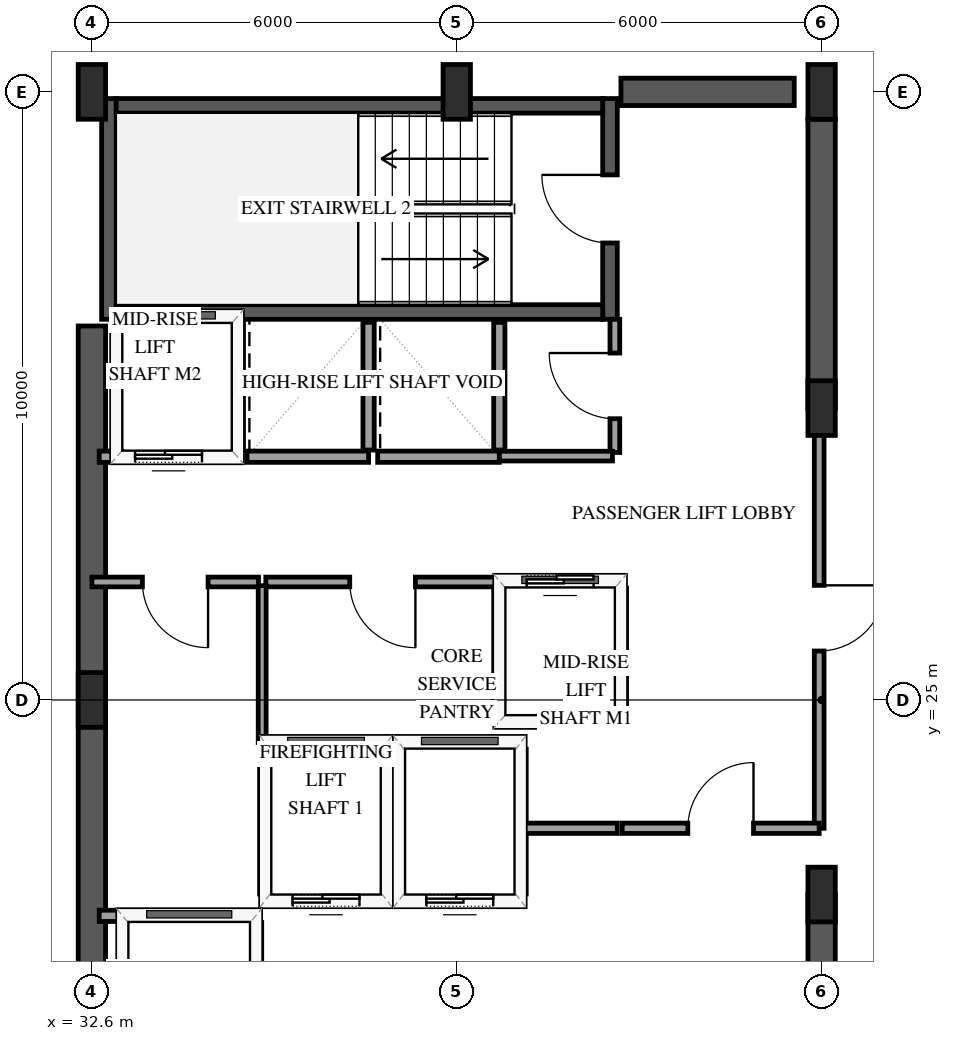
"""IFC4 building model, lengths in metres.
Left out: names, types, materials, properties, quantities, classifications, styles, units other than length and angle.
Written with IfcOpenShell. Run it as: python <this file> out.ifc"""

import sys

from ifc_helpers import new_model, si_unit, direction, frame, frame_2d, origin, origin_2d, place, context, subcontext, project, spatial, rectangle, extrude, element, fill, save


model = new_model("IFC4")
c1 = context("Model", 3, precision=1e-05, world=origin(), true_north=direction((0.0, 1.0)))
c2 = subcontext(c1, "Body", "Model", "MODEL_VIEW")
j1 = project(units=[si_unit("LENGTHUNIT", "METRE"), si_unit("PLANEANGLEUNIT", "RADIAN")], contexts=[c1])
p1 = place(None, origin())
s1 = spatial("IfcSite", under=j1, at=p1, CompositionType="ELEMENT")
p2 = place(p1, origin())
s2 = spatial("IfcBuilding", under=s1, at=p2, CompositionType="ELEMENT")
p3 = place(p2, frame((0.0, 0.0, 205.0)))
s3 = spatial("IfcBuildingStorey", under=s2, at=p3, CompositionType="ELEMENT", Elevation=205.0)
p4 = place(p3, frame((32.88, 31.26, 0.0), z_axis=(0.0, 0.0, 1.0), x_axis=(0.0, 1.0, 0.0)))
e1 = element("IfcWall", 1, at=p4, inside=s3, PredefinedType="SHEAR", context=c2, shape_type="SweptSolid", body=[
    extrude(rectangle(XDim=3.63, YDim=0.24, at=frame_2d((1.815, 0.0))), origin(), (0.0, 0.0, 1.0), 3.6),
])
p5 = place(p3, frame((41.12, 31.26, 0.0), z_axis=(0.0, 0.0, 1.0), x_axis=(0.0, 1.0, 0.0)))
e2 = element("IfcWall", 2, at=p5, inside=s3, PredefinedType="SHEAR", context=c2, shape_type="SweptSolid", body=[
    extrude(rectangle(XDim=3.63, YDim=0.24, at=frame_2d((1.815, 0.0))), origin(), (0.0, 0.0, 1.0), 3.6),
])
p6 = place(p5, frame((1.255, 0.0, 0.0)))
e3 = element("IfcOpeningElement", 3, at=p6, cuts=e2, PredefinedType="OPENING", context=c2, shape_type="SweptSolid", body=[
    extrude(rectangle(XDim=1.12, YDim=2.15, at=frame_2d((0.56, 1.075))), frame((0.0, 0.13, 0.0), z_axis=(0.0, -1.0, 0.0), x_axis=(1.0, 0.0, 0.0)), (0.0, 0.0, 1.0), 0.26),
])
for number, where, z_axis, x_axis in (
    (4, (33.0, 31.38, 0.0), (0.0, 0.0, 1.0), (1.0, 0.0, 0.0)),
    (5, (33.0, 34.77, 0.0), (0.0, 0.0, 1.0), (1.0, 0.0, 0.0)),
):
    element("IfcWall", number, at=place(p3, frame(where, z_axis=z_axis, x_axis=x_axis)), inside=s3, PredefinedType="SHEAR", context=c2, shape_type="SweptSolid", body=[
        extrude(rectangle(XDim=8.0, YDim=0.24, at=frame_2d((4.0, 0.0))), origin(), (0.0, 0.0, 1.0), 3.6),
    ])
p7 = place(p3, frame((32.6, 18.85, 0.0), z_axis=(0.0, 0.0, 1.0), x_axis=(0.0, 1.0, 0.0)))
e6 = element("IfcWall", 6, at=p7, inside=s3, PredefinedType="SHEAR", context=c2, shape_type="SweptSolid", body=[
    extrude(rectangle(XDim=12.3, YDim=0.45, at=frame_2d((6.15, 0.0))), origin(), (0.0, 0.0, 1.0), 3.6),
])
p8 = place(p3, frame((41.3, 35.0, 0.0), z_axis=(0.0, 0.0, 1.0), x_axis=(1.0, 0.0, 0.0)))
e7 = element("IfcWall", 7, at=p8, inside=s3, PredefinedType="SHEAR", context=c2, shape_type="SweptSolid", body=[
    extrude(rectangle(XDim=2.85, YDim=0.45, at=frame_2d((1.425, 0.0))), origin(), (0.0, 0.0, 1.0), 3.6),
])
p9 = place(p3, frame((44.6, 15.45, 0.0), z_axis=(0.0, 0.0, 1.0), x_axis=(0.0, 1.0, 0.0)))
e8 = element("IfcWall", 8, at=p9, inside=s3, PredefinedType="SHEAR", context=c2, shape_type="SweptSolid", body=[
    extrude(rectangle(XDim=6.35, YDim=0.45, at=frame_2d((3.175, 0.0))), origin(), (0.0, 0.0, 1.0), 3.6),
])
p10 = place(p3, frame((44.6, 29.8, 0.0), z_axis=(0.0, 0.0, 1.0), x_axis=(0.0, 1.0, 0.0)))
e9 = element("IfcWall", 9, at=p10, inside=s3, PredefinedType="SHEAR", context=c2, shape_type="SweptSolid", body=[
    extrude(rectangle(XDim=4.75, YDim=0.45, at=frame_2d((2.375, 0.0))), origin(), (0.0, 0.0, 1.0), 3.6),
])
for number, where, z_axis, x_axis in (
    (10, (32.6, 25.0, 0.0), (0.0, 0.0, 1.0), (1.0, 0.0, 0.0)),
    (11, (32.6, 35.0, 0.0), (0.0, 0.0, 1.0), (1.0, 0.0, 0.0)),
    (12, (38.6, 35.0, 0.0), (0.0, 0.0, 1.0), (1.0, 0.0, 0.0)),
    (13, (44.6, 21.8, 0.0), (0.0, 0.0, 1.0), (1.0, 0.0, 0.0)),
    (14, (44.6, 29.8, 0.0), (0.0, 0.0, 1.0), (1.0, 0.0, 0.0)),
    (15, (44.6, 35.0, 0.0), (0.0, 0.0, 1.0), (1.0, 0.0, 0.0)),
):
    element("IfcColumn", number, at=place(p3, frame(where, z_axis=z_axis, x_axis=x_axis)), inside=s3, PredefinedType="PILASTER", context=c2, shape_type="SweptSolid", body=[
        extrude(rectangle(XDim=0.45, YDim=0.9, at=origin_2d()), origin(), (0.0, 0.0, 1.0), 3.6),
    ])
p11 = place(p3, frame((35.45, 21.7, 0.0), z_axis=(0.0, 0.0, 1.0), x_axis=(1.0, 0.0, 0.0)))
e16 = element("IfcWall", 16, at=p11, inside=s3, PredefinedType="SOLIDWALL", context=c2, shape_type="SweptSolid", body=[
    extrude(rectangle(XDim=2.0, YDim=0.185, at=frame_2d((1.0, 0.0))), origin(), (0.0, 0.0, 1.0), 3.3),
])
p12 = place(p11, frame((0.45, 0.0, 0.0)))
e17 = element("IfcOpeningElement", 17, at=p12, cuts=e16, PredefinedType="OPENING", context=c2, shape_type="SweptSolid", body=[
    extrude(rectangle(XDim=1.1, YDim=2.15, at=frame_2d((0.55, 1.075))), frame((0.0, 0.103, 0.0), z_axis=(0.0, -1.0, 0.0), x_axis=(1.0, 0.0, 0.0)), (0.0, 0.0, 1.0), 0.205),
])
p13 = place(p3, frame((35.45, 24.3, 0.0), z_axis=(0.0, 0.0, 1.0), x_axis=(1.0, 0.0, 0.0)))
e18 = element("IfcWall", 18, at=p13, inside=s3, PredefinedType="SOLIDWALL", context=c2, shape_type="SweptSolid", body=[
    extrude(rectangle(XDim=2.0, YDim=0.185, at=frame_2d((1.0, 0.0))), origin(), (0.0, 0.0, 1.0), 3.3),
])
for number, where, z_axis, x_axis in (
    (19, (35.45, 21.81, 0.0), (0.0, 0.0, 1.0), (0.0, 1.0, 0.0)),
    (20, (37.45, 21.81, 0.0), (0.0, 0.0, 1.0), (0.0, 1.0, 0.0)),
):
    element("IfcWall", number, at=place(p3, frame(where, z_axis=z_axis, x_axis=x_axis)), inside=s3, PredefinedType="SOLIDWALL", context=c2, shape_type="SweptSolid", body=[
        extrude(rectangle(XDim=2.38, YDim=0.185, at=frame_2d((1.19, 0.0))), origin(), (0.0, 0.0, 1.0), 3.3),
    ])
p14 = place(p3, frame((37.65, 21.7, 0.0), z_axis=(0.0, 0.0, 1.0), x_axis=(1.0, 0.0, 0.0)))
e21 = element("IfcWall", 21, at=p14, inside=s3, PredefinedType="SOLIDWALL", context=c2, shape_type="SweptSolid", body=[
    extrude(rectangle(XDim=2.0, YDim=0.185, at=frame_2d((1.0, 0.0))), origin(), (0.0, 0.0, 1.0), 3.3),
])
p15 = place(p14, frame((0.45, 0.0, 0.0)))
e22 = element("IfcOpeningElement", 22, at=p15, cuts=e21, PredefinedType="OPENING", context=c2, shape_type="SweptSolid", body=[
    extrude(rectangle(XDim=1.1, YDim=2.15, at=frame_2d((0.55, 1.075))), frame((0.0, 0.103, 0.0), z_axis=(0.0, -1.0, 0.0), x_axis=(1.0, 0.0, 0.0)), (0.0, 0.0, 1.0), 0.205),
])
p16 = place(p3, frame((37.65, 24.3, 0.0), z_axis=(0.0, 0.0, 1.0), x_axis=(1.0, 0.0, 0.0)))
e23 = element("IfcWall", 23, at=p16, inside=s3, PredefinedType="SOLIDWALL", context=c2, shape_type="SweptSolid", body=[
    extrude(rectangle(XDim=2.0, YDim=0.185, at=frame_2d((1.0, 0.0))), origin(), (0.0, 0.0, 1.0), 3.3),
])
p17 = place(p3, frame((39.65, 21.81, 0.0), z_axis=(0.0, 0.0, 1.0), x_axis=(0.0, 1.0, 0.0)))
e24 = element("IfcWall", 24, at=p17, inside=s3, PredefinedType="SOLIDWALL", context=c2, shape_type="SweptSolid", body=[
    extrude(rectangle(XDim=2.38, YDim=0.185, at=frame_2d((1.19, 0.0))), origin(), (0.0, 0.0, 1.0), 3.3),
])
p18 = place(p3, frame((32.72, 21.45, 0.0), z_axis=(0.0, 0.0, 1.0), x_axis=(1.0, 0.0, 0.0)))
e25 = element("IfcWall", 25, at=p18, inside=s3, PredefinedType="SOLIDWALL", context=c2, shape_type="SweptSolid", body=[
    extrude(rectangle(XDim=2.58, YDim=0.185, at=frame_2d((1.29, 0.0))), origin(), (0.0, 0.0, 1.0), 3.3),
])
p19 = place(p3, frame((35.3, 18.79, 0.0), z_axis=(0.0, 0.0, 1.0), x_axis=(0.0, 1.0, 0.0)))
e26 = element("IfcWall", 26, at=p19, inside=s3, PredefinedType="SOLIDWALL", context=c2, shape_type="SweptSolid", body=[
    extrude(rectangle(XDim=2.55, YDim=0.185, at=frame_2d((1.275, 0.0))), origin(), (0.0, 0.0, 1.0), 3.3),
])
p20 = place(p19, frame((0.725, 0.0, 0.0)))
e27 = element("IfcOpeningElement", 27, at=p20, cuts=e26, PredefinedType="OPENING", context=c2, shape_type="SweptSolid", body=[
    extrude(rectangle(XDim=1.1, YDim=2.15, at=frame_2d((0.55, 1.075))), frame((0.0, 0.103, 0.0), z_axis=(0.0, -1.0, 0.0), x_axis=(1.0, 0.0, 0.0)), (0.0, 0.0, 1.0), 0.205),
])
p21 = place(p3, frame((39.3, 24.65, 0.0), z_axis=(0.0, 0.0, 1.0), x_axis=(1.0, 0.0, 0.0)))
e28 = element("IfcWall", 28, at=p21, inside=s3, PredefinedType="SOLIDWALL", context=c2, shape_type="SweptSolid", body=[
    extrude(rectangle(XDim=2.0, YDim=0.185, at=frame_2d((1.0, 0.0))), origin(), (0.0, 0.0, 1.0), 3.3),
])
p22 = place(p3, frame((39.3, 26.95, 0.0), z_axis=(0.0, 0.0, 1.0), x_axis=(1.0, 0.0, 0.0)))
e29 = element("IfcWall", 29, at=p22, inside=s3, PredefinedType="SOLIDWALL", context=c2, shape_type="SweptSolid", body=[
    extrude(rectangle(XDim=2.0, YDim=0.185, at=frame_2d((1.0, 0.0))), origin(), (0.0, 0.0, 1.0), 3.3),
])
p23 = place(p22, frame((0.45, 0.0, 0.0)))
e30 = element("IfcOpeningElement", 30, at=p23, cuts=e29, PredefinedType="OPENING", context=c2, shape_type="SweptSolid", body=[
    extrude(rectangle(XDim=1.1, YDim=2.15, at=frame_2d((0.55, 1.075))), frame((0.0, 0.103, 0.0), z_axis=(0.0, -1.0, 0.0), x_axis=(1.0, 0.0, 0.0)), (0.0, 0.0, 1.0), 0.205),
])
for number, where, z_axis, x_axis in (
    (31, (39.3, 24.76, 0.0), (0.0, 0.0, 1.0), (0.0, 1.0, 0.0)),
    (32, (41.3, 24.76, 0.0), (0.0, 0.0, 1.0), (0.0, 1.0, 0.0)),
):
    element("IfcWall", number, at=place(p3, frame(where, z_axis=z_axis, x_axis=x_axis)), inside=s3, PredefinedType="SOLIDWALL", context=c2, shape_type="SweptSolid", body=[
        extrude(rectangle(XDim=2.08, YDim=0.185, at=frame_2d((1.04, 0.0))), origin(), (0.0, 0.0, 1.0), 3.3),
    ])
p24 = place(p3, frame((32.72, 29.0, 0.0), z_axis=(0.0, 0.0, 1.0), x_axis=(1.0, 0.0, 0.0)))
e33 = element("IfcWall", 33, at=p24, inside=s3, PredefinedType="SOLIDWALL", context=c2, shape_type="SweptSolid", body=[
    extrude(rectangle(XDim=2.28, YDim=0.185, at=frame_2d((1.14, 0.0))), origin(), (0.0, 0.0, 1.0), 3.3),
])
p25 = place(p24, frame((0.59, 0.0, 0.0)))
e34 = element("IfcOpeningElement", 34, at=p25, cuts=e33, PredefinedType="OPENING", context=c2, shape_type="SweptSolid", body=[
    extrude(rectangle(XDim=1.1, YDim=2.15, at=frame_2d((0.55, 1.075))), frame((0.0, 0.103, 0.0), z_axis=(0.0, -1.0, 0.0), x_axis=(1.0, 0.0, 0.0)), (0.0, 0.0, 1.0), 0.205),
])
p26 = place(p3, frame((35.0, 29.11, 0.0), z_axis=(0.0, 0.0, 1.0), x_axis=(0.0, 1.0, 0.0)))
e35 = element("IfcWall", 35, at=p26, inside=s3, PredefinedType="SOLIDWALL", context=c2, shape_type="SweptSolid", body=[
    extrude(rectangle(XDim=2.1, YDim=0.185, at=frame_2d((1.05, 0.0))), origin(), (0.0, 0.0, 1.0), 3.3),
])
p27 = place(p3, frame((35.15, 29.0, 0.0), z_axis=(0.0, 0.0, 1.0), x_axis=(1.0, 0.0, 0.0)))
e36 = element("IfcWall", 36, at=p27, inside=s3, PredefinedType="SOLIDWALL", context=c2, shape_type="SweptSolid", body=[
    extrude(rectangle(XDim=2.0, YDim=0.185, at=frame_2d((1.0, 0.0))), origin(), (0.0, 0.0, 1.0), 3.3),
])
p28 = place(p3, frame((37.15, 29.11, 0.0), z_axis=(0.0, 0.0, 1.0), x_axis=(0.0, 1.0, 0.0)))
e37 = element("IfcWall", 37, at=p28, inside=s3, PredefinedType="SOLIDWALL", context=c2, shape_type="SweptSolid", body=[
    extrude(rectangle(XDim=2.1, YDim=0.185, at=frame_2d((1.05, 0.0))), origin(), (0.0, 0.0, 1.0), 3.3),
])
p29 = place(p3, frame((37.3, 29.0, 0.0), z_axis=(0.0, 0.0, 1.0), x_axis=(1.0, 0.0, 0.0)))
e38 = element("IfcWall", 38, at=p29, inside=s3, PredefinedType="SOLIDWALL", context=c2, shape_type="SweptSolid", body=[
    extrude(rectangle(XDim=2.0, YDim=0.185, at=frame_2d((1.0, 0.0))), origin(), (0.0, 0.0, 1.0), 3.3),
])
p30 = place(p3, frame((39.3, 29.11, 0.0), z_axis=(0.0, 0.0, 1.0), x_axis=(0.0, 1.0, 0.0)))
e39 = element("IfcWall", 39, at=p30, inside=s3, PredefinedType="SOLIDWALL", context=c2, shape_type="SweptSolid", body=[
    extrude(rectangle(XDim=2.1, YDim=0.185, at=frame_2d((1.05, 0.0))), origin(), (0.0, 0.0, 1.0), 3.3),
])
p31 = place(p3, frame((44.56, 29.8, 0.0), z_axis=(0.0, 0.0, 1.0), x_axis=(0.0, -1.0, 0.0)))
e40 = element("IfcWall", 40, at=p31, inside=s3, PredefinedType="PARTITIONING", context=c2, shape_type="SweptSolid", body=[
    extrude(rectangle(XDim=6.91, YDim=0.16, at=frame_2d((3.455, 0.0))), origin(), (0.0, 0.0, 1.0), 2.34),
])
p32 = place(p31, frame((2.915, 0.0, 0.0)))
e41 = element("IfcOpeningElement", 41, at=p32, cuts=e40, PredefinedType="OPENING", context=c2, shape_type="SweptSolid", body=[
    extrude(rectangle(XDim=1.08, YDim=2.15, at=frame_2d((0.54, 1.075))), frame((0.0, 0.09, 0.0), z_axis=(0.0, -1.0, 0.0), x_axis=(1.0, 0.0, 0.0)), (0.0, 0.0, 1.0), 0.18),
])
p33 = place(p3, frame((39.3, 26.94, 0.0), z_axis=(0.0, 0.0, 1.0), x_axis=(-1.0, 0.0, 0.0)))
e42 = element("IfcWall", 42, at=p33, inside=s3, PredefinedType="PARTITIONING", context=c2, shape_type="SweptSolid", body=[
    extrude(rectangle(XDim=3.84, YDim=0.16, at=frame_2d((1.92, 0.0))), origin(), (0.0, 0.0, 1.0), 3.3),
])
p34 = place(p33, frame((1.38, 0.0, 0.0)))
e43 = element("IfcOpeningElement", 43, at=p34, cuts=e42, PredefinedType="OPENING", context=c2, shape_type="SweptSolid", body=[
    extrude(rectangle(XDim=1.08, YDim=2.15, at=frame_2d((0.54, 1.075))), frame((0.0, 0.09, 0.0), z_axis=(0.0, -1.0, 0.0), x_axis=(1.0, 0.0, 0.0)), (0.0, 0.0, 1.0), 0.18),
])
p35 = place(p3, frame((41.32, 22.89, 0.0), z_axis=(0.0, 0.0, 1.0), x_axis=(1.0, 0.0, 0.0)))
e44 = element("IfcWall", 44, at=p35, inside=s3, PredefinedType="PARTITIONING", context=c2, shape_type="SweptSolid", body=[
    extrude(rectangle(XDim=3.24, YDim=0.17, at=frame_2d((1.62, 0.0))), origin(), (0.0, 0.0, 1.0), 3.3),
])
p36 = place(p35, frame((1.08, 0.0, 0.0)))
e45 = element("IfcOpeningElement", 45, at=p36, cuts=e44, PredefinedType="OPENING", context=c2, shape_type="SweptSolid", body=[
    extrude(rectangle(XDim=1.08, YDim=2.15, at=frame_2d((0.54, 1.075))), frame((0.0, 0.095, 0.0), z_axis=(0.0, -1.0, 0.0), x_axis=(1.0, 0.0, 0.0)), (0.0, 0.0, 1.0), 0.19),
])
p37 = place(p3, frame((35.34, 26.94, 0.0), z_axis=(0.0, 0.0, 1.0), x_axis=(-1.0, 0.0, 0.0)))
e46 = element("IfcWall", 46, at=p37, inside=s3, PredefinedType="PARTITIONING", context=c2, shape_type="SweptSolid", body=[
    extrude(rectangle(XDim=2.74, YDim=0.16, at=frame_2d((1.37, 0.0))), origin(), (0.0, 0.0, 1.0), 3.3),
])
p38 = place(p37, frame((0.83, 0.0, 0.0)))
e47 = element("IfcOpeningElement", 47, at=p38, cuts=e46, PredefinedType="OPENING", context=c2, shape_type="SweptSolid", body=[
    extrude(rectangle(XDim=1.08, YDim=2.15, at=frame_2d((0.54, 1.075))), frame((0.0, 0.09, 0.0), z_axis=(0.0, -1.0, 0.0), x_axis=(1.0, 0.0, 0.0)), (0.0, 0.0, 1.0), 0.18),
])
p39 = place(p3, frame((35.4, 26.88, 0.0), z_axis=(0.0, 0.0, 1.0), x_axis=(0.0, -1.0, 0.0)))
e48 = element("IfcWall", 48, at=p39, inside=s3, PredefinedType="PARTITIONING", context=c2, shape_type="SweptSolid", body=[
    extrude(rectangle(XDim=2.58, YDim=0.13, at=frame_2d((1.29, 0.0))), origin(), (0.0, 0.0, 1.0), 3.3),
])
p40 = place(p3, frame((41.2, 29.07, 0.0), z_axis=(0.0, 0.0, 1.0), x_axis=(0.0, 1.0, 0.0)))
e49 = element("IfcWall", 49, at=p40, inside=s3, PredefinedType="PARTITIONING", context=c2, shape_type="SweptSolid", body=[
    extrude(rectangle(XDim=2.19, YDim=0.16, at=frame_2d((1.095, 0.0))), origin(), (0.0, 0.0, 1.0), 3.3),
])
p41 = place(p40, frame((0.555, 0.0, 0.0)))
e50 = element("IfcOpeningElement", 50, at=p41, cuts=e49, PredefinedType="OPENING", context=c2, shape_type="SweptSolid", body=[
    extrude(rectangle(XDim=1.08, YDim=2.15, at=frame_2d((0.54, 1.075))), frame((0.0, 0.09, 0.0), z_axis=(0.0, -1.0, 0.0), x_axis=(1.0, 0.0, 0.0)), (0.0, 0.0, 1.0), 0.18),
])
p42 = place(p3, frame((39.3, 29.01, 0.0), z_axis=(0.0, 0.0, 1.0), x_axis=(1.0, 0.0, 0.0)))
e51 = element("IfcWall", 51, at=p42, inside=s3, PredefinedType="PARTITIONING", context=c2, shape_type="SweptSolid", body=[
    extrude(rectangle(XDim=1.86, YDim=0.16, at=frame_2d((0.93, 0.0))), origin(), (0.0, 0.0, 1.0), 3.3),
])
p43 = place(p3, frame((39.72, 22.89, 0.0), z_axis=(0.0, 0.0, 1.0), x_axis=(1.0, 0.0, 0.0)))
e52 = element("IfcWall", 52, at=p43, inside=s3, PredefinedType="PARTITIONING", context=c2, shape_type="SweptSolid", body=[
    extrude(rectangle(XDim=1.52, YDim=0.17, at=frame_2d((0.76, 0.0))), origin(), (0.0, 0.0, 1.0), 3.3),
])
p44 = place(p12, origin())
e53 = element("IfcDoor", 53, at=p44, inside=s3, OperationType="SLIDING_TO_LEFT", PredefinedType="DOOR", context=c2, shape_type="SweptSolid", body=[
    extrude(rectangle(XDim=1.1, YDim=2.15, at=frame_2d((0.55, 1.075))), frame((0.0, 0.025, 0.0), z_axis=(0.0, -1.0, 0.0), x_axis=(1.0, 0.0, 0.0)), (0.0, 0.0, 1.0), 0.05),
])
fill(e17, e53)
p45 = place(p15, origin())
e54 = element("IfcDoor", 54, at=p45, inside=s3, OperationType="SLIDING_TO_LEFT", PredefinedType="DOOR", context=c2, shape_type="SweptSolid", body=[
    extrude(rectangle(XDim=1.1, YDim=2.15, at=frame_2d((0.55, 1.075))), frame((0.0, 0.025, 0.0), z_axis=(0.0, -1.0, 0.0), x_axis=(1.0, 0.0, 0.0)), (0.0, 0.0, 1.0), 0.05),
])
fill(e22, e54)
p46 = place(p23, origin())
e55 = element("IfcDoor", 55, at=p46, inside=s3, OperationType="SLIDING_TO_LEFT", PredefinedType="DOOR", context=c2, shape_type="SweptSolid", body=[
    extrude(rectangle(XDim=1.1, YDim=2.15, at=frame_2d((0.55, 1.075))), frame((0.0, 0.025, 0.0), z_axis=(0.0, -1.0, 0.0), x_axis=(1.0, 0.0, 0.0)), (0.0, 0.0, 1.0), 0.05),
])
fill(e30, e55)
p47 = place(p25, origin())
e56 = element("IfcDoor", 56, at=p47, inside=s3, OperationType="SLIDING_TO_LEFT", PredefinedType="DOOR", context=c2, shape_type="SweptSolid", body=[
    extrude(rectangle(XDim=1.1, YDim=2.15, at=frame_2d((0.55, 1.075))), frame((0.0, 0.025, 0.0), z_axis=(0.0, -1.0, 0.0), x_axis=(1.0, 0.0, 0.0)), (0.0, 0.0, 1.0), 0.05),
])
fill(e34, e56)
p48 = place(p6, origin())
e57 = element("IfcDoor", 57, at=p48, inside=s3, OperationType="SINGLE_SWING_RIGHT", PredefinedType="DOOR", context=c2, shape_type="SweptSolid", body=[
    extrude(rectangle(XDim=1.12, YDim=2.15, at=frame_2d((0.56, 1.075))), frame((0.0, 0.025, 0.0), z_axis=(0.0, -1.0, 0.0), x_axis=(1.0, 0.0, 0.0)), (0.0, 0.0, 1.0), 0.05),
])
fill(e3, e57)
p49 = place(p32, origin())
e58 = element("IfcDoor", 58, at=p49, inside=s3, OperationType="SINGLE_SWING_LEFT", PredefinedType="DOOR", context=c2, shape_type="SweptSolid", body=[
    extrude(rectangle(XDim=1.08, YDim=2.15, at=frame_2d((0.54, 1.075))), frame((0.0, 0.025, 0.0), z_axis=(0.0, -1.0, 0.0), x_axis=(1.0, 0.0, 0.0)), (0.0, 0.0, 1.0), 0.05),
])
fill(e41, e58)
p50 = place(p34, origin())
e59 = element("IfcDoor", 59, at=p50, inside=s3, OperationType="SINGLE_SWING_LEFT", PredefinedType="DOOR", context=c2, shape_type="SweptSolid", body=[
    extrude(rectangle(XDim=1.08, YDim=2.15, at=frame_2d((0.54, 1.075))), frame((0.0, 0.025, 0.0), z_axis=(0.0, -1.0, 0.0), x_axis=(1.0, 0.0, 0.0)), (0.0, 0.0, 1.0), 0.05),
])
fill(e43, e59)
p51 = place(p36, origin())
e60 = element("IfcDoor", 60, at=p51, inside=s3, OperationType="SINGLE_SWING_RIGHT", PredefinedType="DOOR", context=c2, shape_type="SweptSolid", body=[
    extrude(rectangle(XDim=1.08, YDim=2.15, at=frame_2d((0.54, 1.075))), frame((0.0, 0.025, 0.0), z_axis=(0.0, -1.0, 0.0), x_axis=(1.0, 0.0, 0.0)), (0.0, 0.0, 1.0), 0.05),
])
fill(e45, e60)
p52 = place(p38, origin())
e61 = element("IfcDoor", 61, at=p52, inside=s3, OperationType="SINGLE_SWING_LEFT", PredefinedType="DOOR", context=c2, shape_type="SweptSolid", body=[
    extrude(rectangle(XDim=1.08, YDim=2.15, at=frame_2d((0.54, 1.075))), frame((0.0, 0.025, 0.0), z_axis=(0.0, -1.0, 0.0), x_axis=(1.0, 0.0, 0.0)), (0.0, 0.0, 1.0), 0.05),
])
fill(e47, e61)
p53 = place(p41, origin())
e62 = element("IfcDoor", 62, at=p53, inside=s3, OperationType="SINGLE_SWING_RIGHT", PredefinedType="DOOR", context=c2, shape_type="SweptSolid", body=[
    extrude(rectangle(XDim=1.08, YDim=2.15, at=frame_2d((0.54, 1.075))), frame((0.0, 0.025, 0.0), z_axis=(0.0, -1.0, 0.0), x_axis=(1.0, 0.0, 0.0)), (0.0, 0.0, 1.0), 0.05),
])
fill(e50, e62)
save(model, sys.argv[1])
